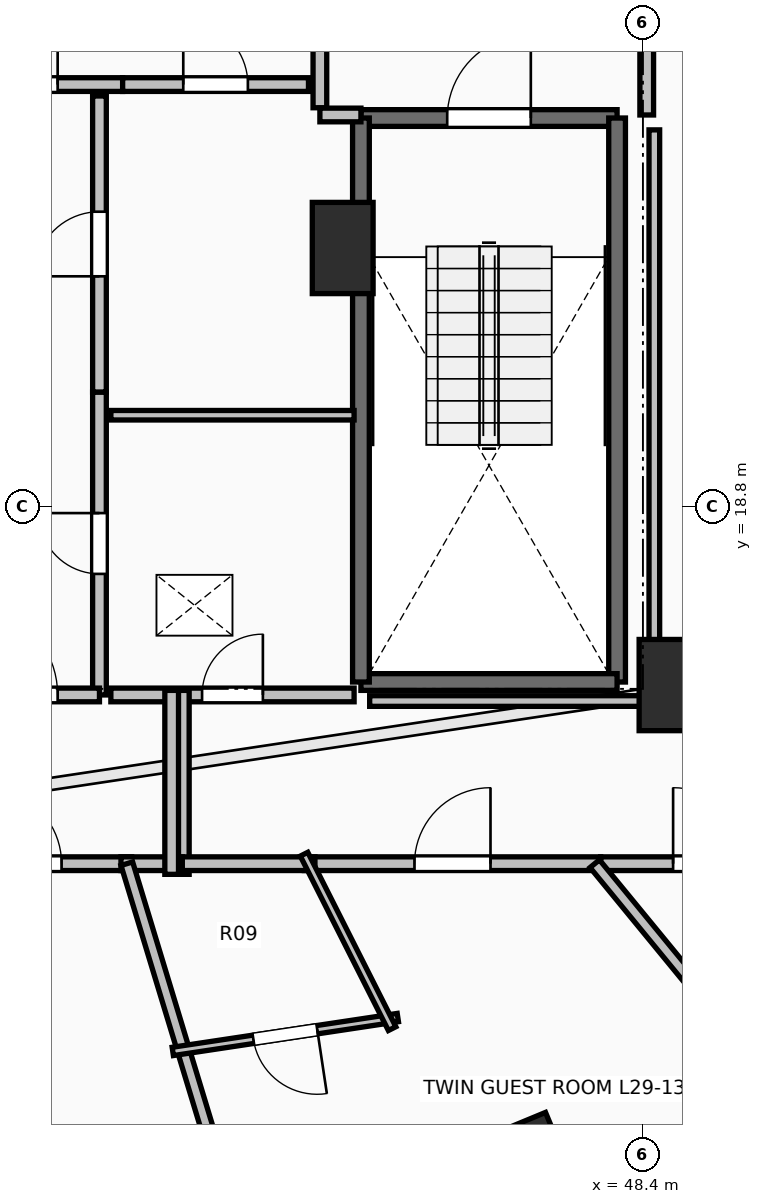
"""IFC4 building model, lengths in metres.
Left out: names, types, materials, properties, quantities, classifications, styles, units other than length and angle.
Written with IfcOpenShell. Run it as: python <this file> out.ifc"""

import sys

from ifc_helpers import new_model, si_unit, direction, frame, frame_2d, origin, origin_2d, place, context, subcontext, project, spatial, rectangle, extrude, element, fill, save


model = new_model("IFC4")
c1 = context("Model", 3, precision=1e-05, world=origin(), true_north=direction((0.0, 1.0)))
c2 = subcontext(c1, "Body", "Model", "MODEL_VIEW")
j1 = project(units=[si_unit("LENGTHUNIT", "METRE"), si_unit("PLANEANGLEUNIT", "RADIAN")], contexts=[c1])
p1 = place(None, origin())
s1 = spatial("IfcSite", under=j1, at=p1, CompositionType="ELEMENT")
p2 = place(p1, origin())
s2 = spatial("IfcBuilding", under=s1, at=p2, CompositionType="ELEMENT")
p3 = place(p2, frame((0.0, 0.0, 110.3)))
s3 = spatial("IfcBuildingStorey", under=s2, at=p3, CompositionType="ELEMENT", Elevation=110.3)
p4 = place(p3, frame((46.821, 10.109, 0.0), z_axis=(0.0, 0.0, 1.0), x_axis=(0.382683432365, -0.923879532511, 0.0)))
e1 = element("IfcColumn", 1, at=p4, inside=s3, PredefinedType="COLUMN", context=c2, shape_type="SweptSolid", body=[
    extrude(rectangle(XDim=1.1, YDim=1.1, at=origin_2d()), origin(), (0.0, 0.0, 1.0), 3.5),
])
for number, where, z_axis, x_axis in (
    (2, (48.75, 16.45, 0.0), (0.0, 0.0, 1.0), (1.0, 0.0, 0.0)),
    (3, (44.45, 22.2, 0.0), (0.0, 0.0, 1.0), (1.0, 0.0, 0.0)),
):
    element("IfcColumn", number, at=place(p3, frame(where, z_axis=z_axis, x_axis=x_axis)), inside=s3, PredefinedType="PILASTER", context=c2, shape_type="SweptSolid", body=[
        extrude(rectangle(XDim=0.8, YDim=1.2, at=origin_2d()), origin(), (0.0, 0.0, 1.0), 3.5),
    ])
p5 = place(p3, frame((44.69, 23.91, 0.0), z_axis=(0.0, 0.0, 1.0), x_axis=(1.0, 0.0, 0.0)))
e4 = element("IfcWall", 4, at=p5, inside=s3, PredefinedType="SOLIDWALL", context=c2, shape_type="SweptSolid", body=[
    extrude(rectangle(XDim=3.37, YDim=0.22, at=frame_2d((1.685, 0.0))), origin(), (0.0, 0.0, 1.0), 3.24),
])
p6 = place(p5, frame((1.135, 0.0, 0.0)))
e5 = element("IfcOpeningElement", 5, at=p6, cuts=e4, PredefinedType="OPENING", context=c2, shape_type="SweptSolid", body=[
    extrude(rectangle(XDim=1.1, YDim=2.15, at=frame_2d((0.55, 1.075))), frame((0.0, 0.125, 0.0), z_axis=(0.0, -1.0, 0.0), x_axis=(1.0, 0.0, 0.0)), (0.0, 0.0, 1.0), 0.25),
])
p7 = place(p3, frame((48.06, 23.91, 0.0), z_axis=(0.0, 0.0, 1.0), x_axis=(0.0, -1.0, 0.0)))
e6 = element("IfcWall", 6, at=p7, inside=s3, PredefinedType="SOLIDWALL", context=c2, shape_type="SweptSolid", body=[
    extrude(rectangle(XDim=7.42, YDim=0.22, at=frame_2d((3.71, 0.0))), origin(), (0.0, 0.0, 1.0), 3.24),
])
p8 = place(p3, frame((48.06, 16.49, 0.0), z_axis=(0.0, 0.0, 1.0), x_axis=(-1.0, 0.0, 0.0)))
e7 = element("IfcWall", 7, at=p8, inside=s3, PredefinedType="SOLIDWALL", context=c2, shape_type="SweptSolid", body=[
    extrude(rectangle(XDim=3.37, YDim=0.22, at=frame_2d((1.685, 0.0))), origin(), (0.0, 0.0, 1.0), 3.24),
])
p9 = place(p3, frame((44.69, 16.49, 0.0), z_axis=(0.0, 0.0, 1.0), x_axis=(0.0, 1.0, 0.0)))
e8 = element("IfcWall", 8, at=p9, inside=s3, PredefinedType="SOLIDWALL", context=c2, shape_type="SweptSolid", body=[
    extrude(rectangle(XDim=7.42, YDim=0.22, at=frame_2d((3.71, 0.0))), origin(), (0.0, 0.0, 1.0), 3.24),
])
p10 = place(p3, frame((44.15, 27.955, 0.0), z_axis=(0.0, 0.0, 1.0), x_axis=(0.0, -1.0, 0.0)))
e9 = element("IfcWall", 9, at=p10, inside=s3, PredefinedType="PARTITIONING", context=c2, shape_type="SweptSolid", body=[
    extrude(rectangle(XDim=3.91, YDim=0.18, at=frame_2d((1.955, 0.0))), origin(), (0.0, 0.0, 1.0), 3.24),
])
p11 = place(p10, frame((1.355, 0.0, 0.0)))
e10 = element("IfcOpeningElement", 10, at=p11, cuts=e9, PredefinedType="OPENING", context=c2, shape_type="SweptSolid", body=[
    extrude(rectangle(XDim=1.2, YDim=2.15, at=frame_2d((0.6, 1.075))), frame((0.0, 0.105, 0.0), z_axis=(0.0, -1.0, 0.0), x_axis=(1.0, 0.0, 0.0)), (0.0, 0.0, 1.0), 0.21),
])
p12 = place(p3, frame((44.15, 23.95, 0.0), z_axis=(0.0, 0.0, 1.0), x_axis=(1.0, 0.0, 0.0)))
e11 = element("IfcWall", 11, at=p12, inside=s3, PredefinedType="PARTITIONING", context=c2, shape_type="SweptSolid", body=[
    extrude(rectangle(XDim=0.54, YDim=0.18, at=frame_2d((0.27, 0.0))), origin(), (0.0, 0.0, 1.0), 3.24),
])
p13 = place(p3, frame((48.45, 23.95, 0.0), z_axis=(0.0, 0.0, 1.0), x_axis=(0.0, 1.0, 0.0)))
e12 = element("IfcWall", 12, at=p13, inside=s3, PredefinedType="PARTITIONING", context=c2, shape_type="SweptSolid", body=[
    extrude(rectangle(XDim=4.05, YDim=0.18, at=frame_2d((2.025, 0.0))), origin(), (0.0, 0.0, 1.0), 3.24),
])
p14 = place(p13, frame((1.425, 0.0, 0.0)))
e13 = element("IfcOpeningElement", 13, at=p14, cuts=e12, PredefinedType="OPENING", context=c2, shape_type="SweptSolid", body=[
    extrude(rectangle(XDim=1.2, YDim=2.15, at=frame_2d((0.6, 1.075))), frame((0.0, 0.105, 0.0), z_axis=(0.0, -1.0, 0.0), x_axis=(1.0, 0.0, 0.0)), (0.0, 0.0, 1.0), 0.21),
])
p15 = place(p3, frame((38.645, 24.35, 0.0), z_axis=(0.0, 0.0, 1.0), x_axis=(1.0, 0.0, 0.0)))
e14 = element("IfcWall", 14, at=p15, inside=s3, PredefinedType="PARTITIONING", context=c2, shape_type="SweptSolid", body=[
    extrude(rectangle(XDim=2.91, YDim=0.18, at=frame_2d((1.455, 0.0))), origin(), (0.0, 0.0, 1.0), 3.24),
])
p16 = place(p15, frame((0.855, 0.0, 0.0)))
e15 = element("IfcOpeningElement", 15, at=p16, cuts=e14, PredefinedType="OPENING", context=c2, shape_type="SweptSolid", body=[
    extrude(rectangle(XDim=1.2, YDim=2.15, at=frame_2d((0.6, 1.075))), frame((0.0, 0.105, 0.0), z_axis=(0.0, -1.0, 0.0), x_axis=(1.0, 0.0, 0.0)), (0.0, 0.0, 1.0), 0.21),
])
p17 = place(p3, frame((41.555, 24.35, 0.0), z_axis=(0.0, 0.0, 1.0), x_axis=(1.0, 0.0, 0.0)))
e16 = element("IfcWall", 16, at=p17, inside=s3, PredefinedType="PARTITIONING", context=c2, shape_type="SweptSolid", body=[
    extrude(rectangle(XDim=2.445, YDim=0.18, at=frame_2d((1.223, 0.0))), origin(), (0.0, 0.0, 1.0), 3.24),
])
p18 = place(p17, frame((0.798, 0.0, 0.0)))
e17 = element("IfcOpeningElement", 17, at=p18, cuts=e16, PredefinedType="OPENING", context=c2, shape_type="SweptSolid", body=[
    extrude(rectangle(XDim=0.85, YDim=2.1, at=frame_2d((0.425, 1.05))), frame((0.0, 0.105, 0.0), z_axis=(0.0, -1.0, 0.0), x_axis=(1.0, 0.0, 0.0)), (0.0, 0.0, 1.0), 0.21),
])
p19 = place(p3, frame((41.25, 16.32, 0.0), z_axis=(0.0, 0.0, 1.0), x_axis=(0.0, 1.0, 0.0)))
e18 = element("IfcWall", 18, at=p19, inside=s3, PredefinedType="PARTITIONING", context=c2, shape_type="SweptSolid", body=[
    extrude(rectangle(XDim=3.985, YDim=0.18, at=frame_2d((1.992, 0.0))), origin(), (0.0, 0.0, 1.0), 3.24),
])
p20 = place(p19, frame((1.593, 0.0, 0.0)))
e19 = element("IfcOpeningElement", 19, at=p20, cuts=e18, PredefinedType="OPENING", context=c2, shape_type="SweptSolid", body=[
    extrude(rectangle(XDim=0.8, YDim=2.05, at=frame_2d((0.4, 1.025))), frame((0.0, 0.105, 0.0), z_axis=(0.0, -1.0, 0.0), x_axis=(1.0, 0.0, 0.0)), (0.0, 0.0, 1.0), 0.21),
])
p21 = place(p3, frame((41.25, 20.305, 0.0), z_axis=(0.0, 0.0, 1.0), x_axis=(0.0, 1.0, 0.0)))
e20 = element("IfcWall", 20, at=p21, inside=s3, PredefinedType="PARTITIONING", context=c2, shape_type="SweptSolid", body=[
    extrude(rectangle(XDim=3.895, YDim=0.18, at=frame_2d((1.948, 0.0))), origin(), (0.0, 0.0, 1.0), 3.24),
])
p22 = place(p21, frame((1.522, 0.0, 0.0)))
e21 = element("IfcOpeningElement", 21, at=p22, cuts=e20, PredefinedType="OPENING", context=c2, shape_type="SweptSolid", body=[
    extrude(rectangle(XDim=0.85, YDim=2.1, at=frame_2d((0.425, 1.05))), frame((0.0, 0.105, 0.0), z_axis=(0.0, -1.0, 0.0), x_axis=(1.0, 0.0, 0.0)), (0.0, 0.0, 1.0), 0.21),
])
p23 = place(p3, frame((38.95, 16.32, 0.0), z_axis=(0.0, 0.0, 1.0), x_axis=(1.0, 0.0, 0.0)))
e22 = element("IfcWall", 22, at=p23, inside=s3, PredefinedType="PARTITIONING", context=c2, shape_type="SweptSolid", body=[
    extrude(rectangle(XDim=2.3, YDim=0.18, at=frame_2d((1.15, 0.0))), origin(), (0.0, 0.0, 1.0), 3.24),
])
p24 = place(p23, frame((0.55, 0.0, 0.0)))
e23 = element("IfcOpeningElement", 23, at=p24, cuts=e22, PredefinedType="OPENING", context=c2, shape_type="SweptSolid", body=[
    extrude(rectangle(XDim=1.2, YDim=2.15, at=frame_2d((0.6, 1.075))), frame((0.0, 0.105, 0.0), z_axis=(0.0, -1.0, 0.0), x_axis=(1.0, 0.0, 0.0)), (0.0, 0.0, 1.0), 0.21),
])
p25 = place(p3, frame((44.6, 20.0, 0.0), z_axis=(0.0, 0.0, 1.0), x_axis=(-1.0, 0.0, 0.0)))
e24 = element("IfcWall", 24, at=p25, inside=s3, PredefinedType="PARTITIONING", context=c2, shape_type="SweptSolid", body=[
    extrude(rectangle(XDim=3.2, YDim=0.125, at=frame_2d((1.6, 0.0))), origin(), (0.0, 0.0, 1.0), 3.24),
])
p26 = place(p3, frame((41.4, 16.32, 0.0), z_axis=(0.0, 0.0, 1.0), x_axis=(1.0, 0.0, 0.0)))
e25 = element("IfcWall", 25, at=p26, inside=s3, PredefinedType="PARTITIONING", context=c2, shape_type="SweptSolid", body=[
    extrude(rectangle(XDim=3.2, YDim=0.18, at=frame_2d((1.6, 0.0))), origin(), (0.0, 0.0, 1.0), 3.24),
])
p27 = place(p26, frame((1.2, 0.0, 0.0)))
e26 = element("IfcOpeningElement", 26, at=p27, cuts=e25, PredefinedType="OPENING", context=c2, shape_type="SweptSolid", body=[
    extrude(rectangle(XDim=0.8, YDim=2.05, at=frame_2d((0.4, 1.025))), frame((0.0, 0.105, 0.0), z_axis=(0.0, -1.0, 0.0), x_axis=(1.0, 0.0, 0.0)), (0.0, 0.0, 1.0), 0.21),
])
p28 = place(p3, frame((38.83, 14.1, 0.0), z_axis=(0.0, 0.0, 1.0), x_axis=(1.0, 0.0, 0.0)))
e27 = element("IfcWall", 27, at=p28, inside=s3, PredefinedType="PARTITIONING", context=c2, shape_type="SweptSolid", body=[
    extrude(rectangle(XDim=2.843, YDim=0.18, at=frame_2d((1.421, 0.0))), origin(), (0.0, 0.0, 1.0), 2.929),
])
p29 = place(p28, frame((0.921, 0.0, 0.0)))
e28 = element("IfcOpeningElement", 28, at=p29, cuts=e27, PredefinedType="OPENING", context=c2, shape_type="SweptSolid", body=[
    extrude(rectangle(XDim=1.0, YDim=2.15, at=frame_2d((0.5, 1.075))), frame((0.0, 0.105, 0.0), z_axis=(0.0, -1.0, 0.0), x_axis=(1.0, 0.0, 0.0)), (0.0, 0.0, 1.0), 0.21),
])
p30 = place(p3, frame((43.945, 14.1, 0.0), z_axis=(0.0, 0.0, 1.0), x_axis=(1.0, 0.0, 0.0)))
e29 = element("IfcWall", 29, at=p30, inside=s3, PredefinedType="PARTITIONING", context=c2, shape_type="SweptSolid", body=[
    extrude(rectangle(XDim=3.899, YDim=0.18, at=frame_2d((1.949, 0.0))), origin(), (0.0, 0.0, 1.0), 2.432),
])
p31 = place(p30, frame((1.449, 0.0, 0.0)))
e30 = element("IfcOpeningElement", 30, at=p31, cuts=e29, PredefinedType="OPENING", context=c2, shape_type="SweptSolid", body=[
    extrude(rectangle(XDim=1.0, YDim=2.15, at=frame_2d((0.5, 1.075))), frame((0.0, 0.105, 0.0), z_axis=(0.0, -1.0, 0.0), x_axis=(1.0, 0.0, 0.0)), (0.0, 0.0, 1.0), 0.21),
])
p32 = place(p3, frame((42.34, 16.38, 0.0), z_axis=(0.0, 0.0, 1.0), x_axis=(0.0, -1.0, 0.0)))
e31 = element("IfcWall", 31, at=p32, inside=s3, PredefinedType="PARTITIONING", context=c2, shape_type="SweptSolid", body=[
    extrude(rectangle(XDim=2.42, YDim=0.18, at=frame_2d((1.21, 0.0))), origin(), (0.0, 0.0, 1.0), 2.929),
])
p33 = place(p3, frame((42.2, 14.1, 0.0), z_axis=(0.0, 0.0, 1.0), x_axis=(1.0, 0.0, 0.0)))
e32 = element("IfcWall", 32, at=p33, inside=s3, PredefinedType="PARTITIONING", context=c2, shape_type="SweptSolid", body=[
    extrude(rectangle(XDim=1.885, YDim=0.18, at=frame_2d((0.942, 0.0))), origin(), (0.0, 0.0, 1.0), 2.929),
])
p34 = place(p3, frame((41.533, 14.1, 0.0), z_axis=(0.0, 0.0, 1.0), x_axis=(1.0, 0.0, 0.0)))
e33 = element("IfcWall", 33, at=p34, inside=s3, PredefinedType="PARTITIONING", context=c2, shape_type="SweptSolid", body=[
    extrude(rectangle(XDim=0.807, YDim=0.18, at=frame_2d((0.404, 0.0))), origin(), (0.0, 0.0, 1.0), 2.929),
])
p35 = place(p3, frame((42.2, 13.96, 0.0), z_axis=(0.0, 0.0, 1.0), x_axis=(0.0, 1.0, 0.0)))
e34 = element("IfcWall", 34, at=p35, inside=s3, PredefinedType="PARTITIONING", context=c2, shape_type="SweptSolid", body=[
    extrude(rectangle(XDim=2.42, YDim=0.18, at=frame_2d((1.21, 0.0))), origin(), (0.0, 0.0, 1.0), 2.929),
])
p36 = place(p3, frame((47.844, 14.1, 0.0), z_axis=(0.0, 0.0, 1.0), x_axis=(1.0, 0.0, 0.0)))
e35 = element("IfcWall", 35, at=p36, inside=s3, PredefinedType="PARTITIONING", context=c2, shape_type="SweptSolid", body=[
    extrude(rectangle(XDim=2.906, YDim=0.18, at=frame_2d((1.453, 0.0))), origin(), (0.0, 0.0, 1.0), 2.432),
])
p37 = place(p36, frame((0.953, 0.0, 0.0)))
e36 = element("IfcOpeningElement", 36, at=p37, cuts=e35, PredefinedType="OPENING", context=c2, shape_type="SweptSolid", body=[
    extrude(rectangle(XDim=1.0, YDim=2.15, at=frame_2d((0.5, 1.075))), frame((0.0, 0.105, 0.0), z_axis=(0.0, -1.0, 0.0), x_axis=(1.0, 0.0, 0.0)), (0.0, 0.0, 1.0), 0.21),
])
p38 = place(p3, frame((43.855, 6.7, 0.0), z_axis=(0.0, 0.0, 1.0), x_axis=(-0.290292155577, 0.956938067176, 0.0)))
e37 = element("IfcWall", 37, at=p38, inside=s3, PredefinedType="PARTITIONING", context=c2, shape_type="SweptSolid", body=[
    extrude(rectangle(XDim=7.733, YDim=0.16, at=frame_2d((3.867, 0.0))), origin(), (0.0, 0.0, 1.0), 2.432),
])
p39 = place(p3, frame((45.175, 12.076, 0.0), z_axis=(0.0, 0.0, 1.0), x_axis=(-0.988865063855, -0.148814937044, 0.0)))
e38 = element("IfcWall", 38, at=p39, inside=s3, PredefinedType="PARTITIONING", context=c2, shape_type="SweptSolid", body=[
    extrude(rectangle(XDim=2.994, YDim=0.11, at=frame_2d((1.497, 0.0))), origin(), (0.0, 0.0, 1.0), 2.432),
])
p40 = place(p39, frame((1.072, 0.0, 0.0)))
e39 = element("IfcOpeningElement", 39, at=p40, cuts=e38, PredefinedType="OPENING", context=c2, shape_type="SweptSolid", body=[
    extrude(rectangle(XDim=0.85, YDim=2.1, at=frame_2d((0.425, 1.05))), frame((0.0, 0.07, 0.0), z_axis=(0.0, -1.0, 0.0), x_axis=(1.0, 0.0, 0.0)), (0.0, 0.0, 1.0), 0.14),
])
p41 = place(p3, frame((43.942, 14.225, 0.0), z_axis=(0.0, 0.0, 1.0), x_axis=(0.450515334881, -0.892768689548, 0.0)))
e40 = element("IfcWall", 40, at=p41, inside=s3, PredefinedType="PARTITIONING", context=c2, shape_type="SweptSolid", body=[
    extrude(rectangle(XDim=2.571, YDim=0.11, at=frame_2d((1.285, 0.0))), origin(), (0.0, 0.0, 1.0), 2.432),
])
p42 = place(p3, frame((51.802, 9.182, 0.0), z_axis=(0.0, 0.0, 1.0), x_axis=(-0.634357186002, 0.773040076948, 0.0)))
e41 = element("IfcWall", 41, at=p42, inside=s3, PredefinedType="PARTITIONING", context=c2, shape_type="SweptSolid", body=[
    extrude(rectangle(XDim=6.362, YDim=0.16, at=frame_2d((3.181, 0.0))), origin(), (0.0, 0.0, 1.0), 2.432),
])
p43 = place(p3, frame((48.55, 23.754, 0.0), z_axis=(0.0, 0.0, 1.0), x_axis=(0.0, -1.0, 0.0)))
e42 = element("IfcWall", 42, at=p43, inside=s3, PredefinedType="PARTITIONING", context=c2, shape_type="SweptSolid", body=[
    extrude(rectangle(XDim=7.514, YDim=0.14, at=frame_2d((3.757, 0.0))), origin(), (0.0, 0.0, 1.0), 2.432),
])
p44 = place(p3, frame((48.55, 16.24, 0.0), z_axis=(0.0, 0.0, 1.0), x_axis=(-1.0, 0.0, 0.0)))
e43 = element("IfcWall", 43, at=p44, inside=s3, PredefinedType="PARTITIONING", context=c2, shape_type="SweptSolid", body=[
    extrude(rectangle(XDim=3.745, YDim=0.14, at=frame_2d((1.873, 0.0))), origin(), (0.0, 0.0, 1.0), 2.432),
])
p45 = place(p6, origin())
e44 = element("IfcDoor", 44, at=p45, inside=s3, OperationType="SINGLE_SWING_RIGHT", PredefinedType="DOOR", context=c2, shape_type="SweptSolid", body=[
    extrude(rectangle(XDim=1.1, YDim=2.15, at=frame_2d((0.55, 1.075))), frame((0.0, 0.025, 0.0), z_axis=(0.0, -1.0, 0.0), x_axis=(1.0, 0.0, 0.0)), (0.0, 0.0, 1.0), 0.05),
])
fill(e5, e44)
p46 = place(p16, origin())
e45 = element("IfcDoor", 45, at=p46, inside=s3, OperationType="SINGLE_SWING_RIGHT", PredefinedType="DOOR", context=c2, shape_type="SweptSolid", body=[
    extrude(rectangle(XDim=1.2, YDim=2.15, at=frame_2d((0.6, 1.075))), frame((0.0, 0.025, 0.0), z_axis=(0.0, -1.0, 0.0), x_axis=(1.0, 0.0, 0.0)), (0.0, 0.0, 1.0), 0.05),
])
fill(e15, e45)
p47 = place(p18, origin())
e46 = element("IfcDoor", 46, at=p47, inside=s3, OperationType="SINGLE_SWING_LEFT", PredefinedType="DOOR", context=c2, shape_type="SweptSolid", body=[
    extrude(rectangle(XDim=0.85, YDim=2.1, at=frame_2d((0.425, 1.05))), frame((0.0, 0.025, 0.0), z_axis=(0.0, -1.0, 0.0), x_axis=(1.0, 0.0, 0.0)), (0.0, 0.0, 1.0), 0.05),
])
fill(e17, e46)
p48 = place(p20, origin())
e47 = element("IfcDoor", 47, at=p48, inside=s3, OperationType="SINGLE_SWING_RIGHT", PredefinedType="DOOR", context=c2, shape_type="SweptSolid", body=[
    extrude(rectangle(XDim=0.8, YDim=2.05, at=frame_2d((0.4, 1.025))), frame((0.0, 0.025, 0.0), z_axis=(0.0, -1.0, 0.0), x_axis=(1.0, 0.0, 0.0)), (0.0, 0.0, 1.0), 0.05),
])
fill(e19, e47)
p49 = place(p22, origin())
e48 = element("IfcDoor", 48, at=p49, inside=s3, OperationType="SINGLE_SWING_LEFT", PredefinedType="DOOR", context=c2, shape_type="SweptSolid", body=[
    extrude(rectangle(XDim=0.85, YDim=2.1, at=frame_2d((0.425, 1.05))), frame((0.0, 0.025, 0.0), z_axis=(0.0, -1.0, 0.0), x_axis=(1.0, 0.0, 0.0)), (0.0, 0.0, 1.0), 0.05),
])
fill(e21, e48)
p50 = place(p24, origin())
e49 = element("IfcDoor", 49, at=p50, inside=s3, OperationType="SINGLE_SWING_LEFT", PredefinedType="DOOR", context=c2, shape_type="SweptSolid", body=[
    extrude(rectangle(XDim=1.2, YDim=2.15, at=frame_2d((0.6, 1.075))), frame((0.0, 0.025, 0.0), z_axis=(0.0, -1.0, 0.0), x_axis=(1.0, 0.0, 0.0)), (0.0, 0.0, 1.0), 0.05),
])
fill(e23, e49)
p51 = place(p27, origin())
e50 = element("IfcDoor", 50, at=p51, inside=s3, OperationType="SINGLE_SWING_RIGHT", PredefinedType="DOOR", context=c2, shape_type="SweptSolid", body=[
    extrude(rectangle(XDim=0.8, YDim=2.05, at=frame_2d((0.4, 1.025))), frame((0.0, 0.025, 0.0), z_axis=(0.0, -1.0, 0.0), x_axis=(1.0, 0.0, 0.0)), (0.0, 0.0, 1.0), 0.05),
])
fill(e26, e50)
p52 = place(p29, origin())
e51 = element("IfcDoor", 51, at=p52, inside=s3, OperationType="SINGLE_SWING_LEFT", PredefinedType="DOOR", context=c2, shape_type="SweptSolid", body=[
    extrude(rectangle(XDim=1.0, YDim=2.15, at=frame_2d((0.5, 1.075))), frame((0.0, 0.025, 0.0), z_axis=(0.0, -1.0, 0.0), x_axis=(1.0, 0.0, 0.0)), (0.0, 0.0, 1.0), 0.05),
])
fill(e28, e51)
p53 = place(p31, origin())
e52 = element("IfcDoor", 52, at=p53, inside=s3, OperationType="SINGLE_SWING_RIGHT", PredefinedType="DOOR", context=c2, shape_type="SweptSolid", body=[
    extrude(rectangle(XDim=1.0, YDim=2.15, at=frame_2d((0.5, 1.075))), frame((0.0, 0.025, 0.0), z_axis=(0.0, -1.0, 0.0), x_axis=(1.0, 0.0, 0.0)), (0.0, 0.0, 1.0), 0.05),
])
fill(e30, e52)
p54 = place(p37, origin())
e53 = element("IfcDoor", 53, at=p54, inside=s3, OperationType="SINGLE_SWING_LEFT", PredefinedType="DOOR", context=c2, shape_type="SweptSolid", body=[
    extrude(rectangle(XDim=1.0, YDim=2.15, at=frame_2d((0.5, 1.075))), frame((0.0, 0.025, 0.0), z_axis=(0.0, -1.0, 0.0), x_axis=(1.0, 0.0, 0.0)), (0.0, 0.0, 1.0), 0.05),
])
fill(e36, e53)
p55 = place(p40, origin())
e54 = element("IfcDoor", 54, at=p55, inside=s3, OperationType="SINGLE_SWING_LEFT", PredefinedType="DOOR", context=c2, shape_type="SweptSolid", body=[
    extrude(rectangle(XDim=0.85, YDim=2.1, at=frame_2d((0.425, 1.05))), frame((0.0, 0.025, 0.0), z_axis=(0.0, -1.0, 0.0), x_axis=(1.0, 0.0, 0.0)), (0.0, 0.0, 1.0), 0.05),
])
fill(e39, e54)
save(model, sys.argv[1])
